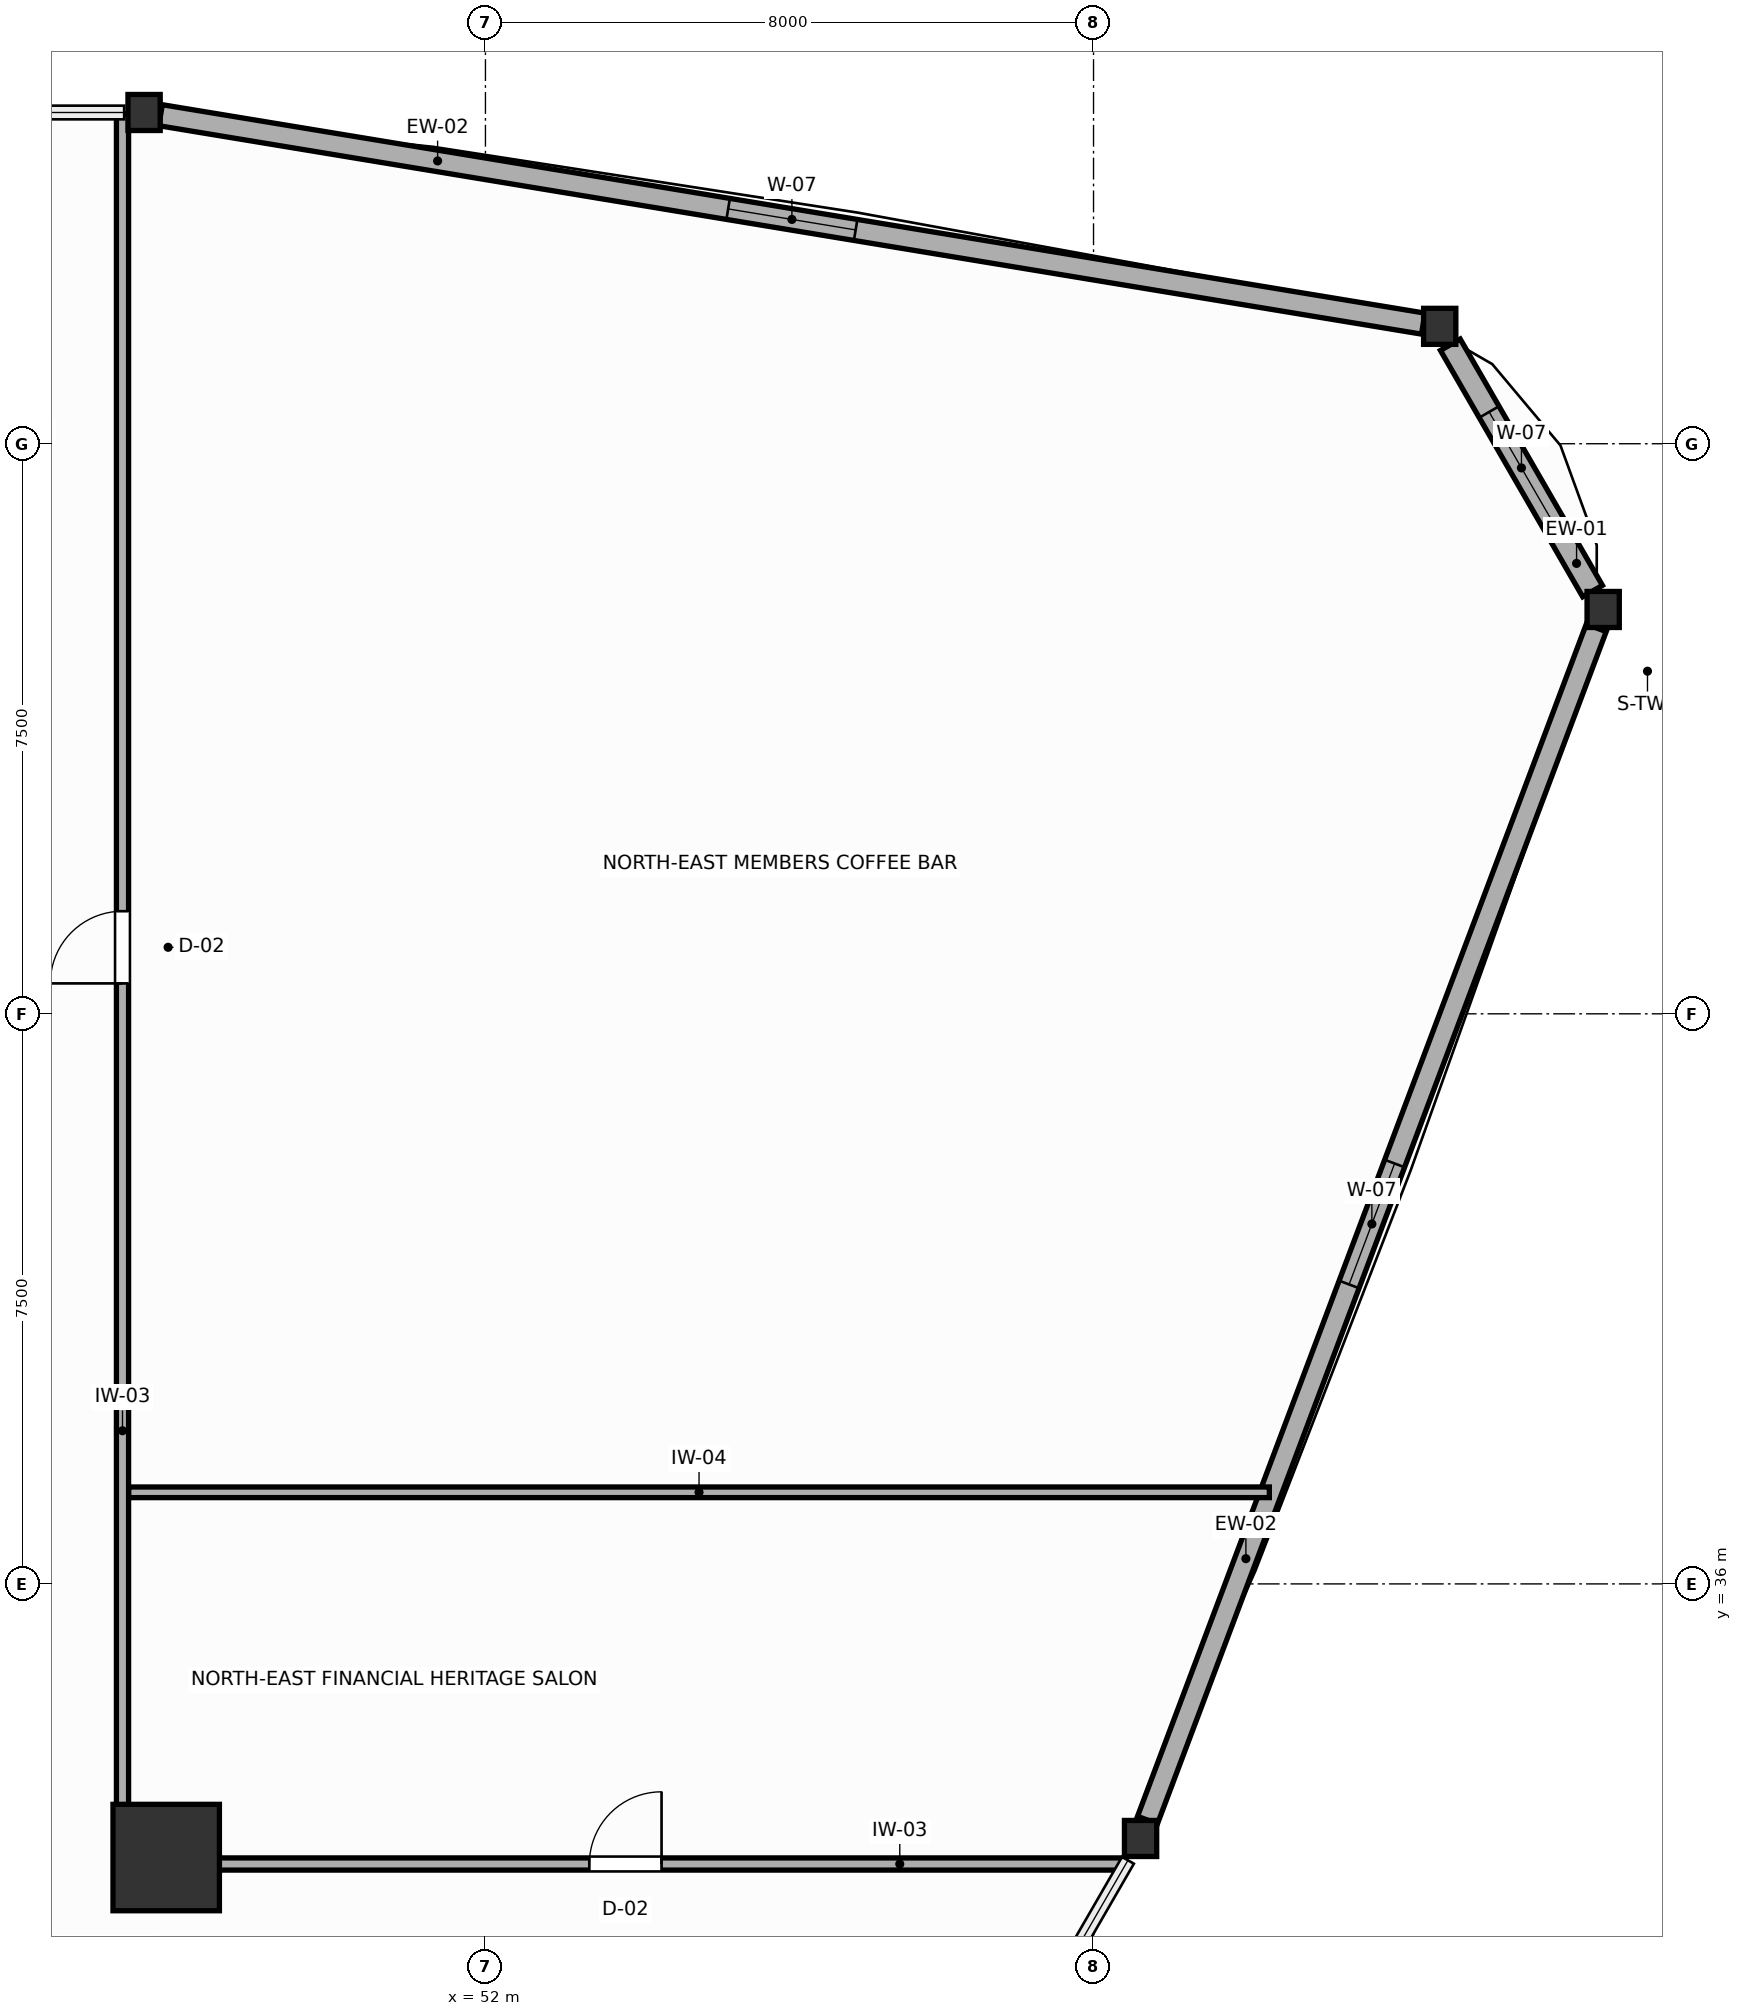
"""IFC4 building model, lengths in metres.
Left out: names, types, materials, properties, quantities, classifications, styles, units other than length and angle.
Written with IfcOpenShell. Run it as: python <this file> out.ifc"""

import sys

from ifc_helpers import new_model, si_unit, direction, frame, frame_2d, origin, origin_2d, place, context, subcontext, project, spatial, rectangle, i_section, extrude, source, transform, mapped, element, fill, save


model = new_model("IFC4")
c1 = context("Model", 3, precision=1e-05, world=origin(), true_north=direction((0.0, 1.0)))
c2 = subcontext(c1, "Body", "Model", "MODEL_VIEW")
j1 = project(units=[si_unit("LENGTHUNIT", "METRE"), si_unit("PLANEANGLEUNIT", "RADIAN")], contexts=[c1])
p1 = place(None, origin())
s1 = spatial("IfcSite", under=j1, at=p1, CompositionType="ELEMENT")
p2 = place(p1, origin())
s2 = spatial("IfcBuilding", under=s1, at=p2, CompositionType="ELEMENT")
p3 = place(p2, frame((0.0, 0.0, 95.1)))
s3 = spatial("IfcBuildingStorey", under=s2, at=p3, CompositionType="ELEMENT", Elevation=95.1)
m1 = source(origin(), c2, "Body", "SweptSolid", [
    extrude(rectangle(XDim=1.4, YDim=1.4, at=origin_2d()), origin(), (0.0, 0.0, 1.0), 3.9),
])
p4 = place(p3, frame((47.8, 32.4, 0.0), z_axis=(0.0, 0.0, 1.0), x_axis=(1.0, 0.0, 0.0)))
e1 = element("IfcColumn", 1, at=p4, inside=s3, PredefinedType="COLUMN", context=c2, shape_type="MappedRepresentation", body=[
    mapped(m1, transform((0.0, 0.0, 0.0), scale=1.0)),
])
m2 = source(origin(), c2, "Body", "SweptSolid", [
    extrude(i_section(OverallWidth=0.424, OverallDepth=0.474, WebThickness=0.045, FlangeThickness=0.072, FilletRadius=0.015, at=origin_2d()), origin(), (0.0, 0.0, 1.0), 3.9),
])
for number, where, z_axis, x_axis in (
    (2, (66.705, 48.82, 0.0), (0.0, 0.0, 1.0), (1.0, 0.0, 0.0)),
    (3, (64.554, 52.544, 0.0), (0.0, 0.0, 1.0), (1.0, 0.0, 0.0)),
    (4, (47.509, 55.358, 0.0), (0.0, 0.0, 1.0), (1.0, 0.0, 0.0)),
    (5, (60.619, 32.651, 0.0), (0.0, 0.0, 1.0), (1.0, 0.0, 0.0)),
):
    element("IfcColumn", number, at=place(p3, frame(where, z_axis=z_axis, x_axis=x_axis)), inside=s3, PredefinedType="COLUMN", context=c2, shape_type="MappedRepresentation", body=[
        mapped(m2, transform((0.0, 0.0, 0.0), scale=1.0)),
    ])
p5 = place(p3, frame((66.565, 49.062, 0.0), z_axis=(0.0, 0.0, 1.0), x_axis=(-0.500012356405, 0.866018269693, 0.0)))
e6 = element("IfcWall", 6, at=p5, inside=s3, PredefinedType="SOLIDWALL", context=c2, shape_type="SweptSolid", body=[
    extrude(rectangle(XDim=3.742, YDim=0.3, at=frame_2d((1.871, 0.0))), origin(), (0.0, 0.0, 1.0), 2.07),
])
p6 = place(p5, frame((1.021, 0.0, 0.75)))
e7 = element("IfcOpeningElement", 7, at=p6, cuts=e6, PredefinedType="OPENING", context=c2, shape_type="SweptSolid", body=[
    extrude(rectangle(XDim=1.7, YDim=1.1, at=frame_2d((0.85, 0.55))), frame((0.0, 0.16, 0.0), z_axis=(0.0, -1.0, 0.0), x_axis=(1.0, 0.0, 0.0)), (0.0, 0.0, 1.0), 0.32),
])
p7 = place(p3, frame((64.337, 52.58, 0.0), z_axis=(0.0, 0.0, 1.0), x_axis=(-0.986649040197, 0.162860896097, 0.0)))
e8 = element("IfcWall", 8, at=p7, inside=s3, PredefinedType="SOLIDWALL", context=c2, shape_type="SweptSolid", body=[
    extrude(rectangle(XDim=16.836, YDim=0.28, at=frame_2d((8.418, 0.0))), origin(), (0.0, 0.0, 1.0), 2.07),
])
p8 = place(p7, frame((7.568, 0.0, 0.75)))
e9 = element("IfcOpeningElement", 9, at=p8, cuts=e8, PredefinedType="OPENING", context=c2, shape_type="SweptSolid", body=[
    extrude(rectangle(XDim=1.7, YDim=1.1, at=frame_2d((0.85, 0.55))), frame((0.0, 0.15, 0.0), z_axis=(0.0, -1.0, 0.0), x_axis=(1.0, 0.0, 0.0)), (0.0, 0.0, 1.0), 0.3),
])
p9 = place(p3, frame((60.71, 32.893, 0.0), z_axis=(0.0, 0.0, 1.0), x_axis=(0.352291780657, 0.935890218605, 0.0)))
e10 = element("IfcWall", 10, at=p9, inside=s3, PredefinedType="SOLIDWALL", context=c2, shape_type="SweptSolid", body=[
    extrude(rectangle(XDim=16.759, YDim=0.28, at=frame_2d((8.379, 0.0))), origin(), (0.0, 0.0, 1.0), 2.07),
])
p10 = place(p9, frame((7.53, 0.0, 0.75)))
e11 = element("IfcOpeningElement", 11, at=p10, cuts=e10, PredefinedType="OPENING", context=c2, shape_type="SweptSolid", body=[
    extrude(rectangle(XDim=1.7, YDim=1.1, at=frame_2d((0.85, 0.55))), frame((0.0, 0.15, 0.0), z_axis=(0.0, -1.0, 0.0), x_axis=(1.0, 0.0, 0.0)), (0.0, 0.0, 1.0), 0.3),
])
p11 = place(p3, frame((47.225, 32.31, 0.0), z_axis=(0.0, 0.0, 1.0), x_axis=(0.0, 1.0, 0.0)))
e12 = element("IfcWall", 12, at=p11, inside=s3, PredefinedType="PARTITIONING", context=c2, shape_type="SweptSolid", body=[
    extrude(rectangle(XDim=23.028, YDim=0.16, at=frame_2d((11.514, 0.0))), origin(), (0.0, 0.0, 1.0), 2.23),
])
p12 = place(p11, frame((11.59, 0.0, 0.0)))
e13 = element("IfcOpeningElement", 13, at=p12, cuts=e12, PredefinedType="OPENING", context=c2, shape_type="SweptSolid", body=[
    extrude(rectangle(XDim=0.95, YDim=2.05, at=frame_2d((0.475, 1.025))), frame((0.0, 0.09, 0.0), z_axis=(0.0, -1.0, 0.0), x_axis=(1.0, 0.0, 0.0)), (0.0, 0.0, 1.0), 0.18),
])
p13 = place(p3, frame((47.307, 32.315, 0.0), z_axis=(0.0, 0.0, 1.0), x_axis=(1.0, 0.0, 0.0)))
e14 = element("IfcWall", 14, at=p13, inside=s3, PredefinedType="PARTITIONING", context=c2, shape_type="SweptSolid", body=[
    extrude(rectangle(XDim=13.098, YDim=0.16, at=frame_2d((6.549, 0.0))), origin(), (0.0, 0.0, 1.0), 2.23),
])
p14 = place(p13, frame((6.06, 0.0, 0.0)))
e15 = element("IfcOpeningElement", 15, at=p14, cuts=e14, PredefinedType="OPENING", context=c2, shape_type="SweptSolid", body=[
    extrude(rectangle(XDim=0.95, YDim=2.05, at=frame_2d((0.475, 1.025))), frame((0.0, 0.09, 0.0), z_axis=(0.0, -1.0, 0.0), x_axis=(1.0, 0.0, 0.0)), (0.0, 0.0, 1.0), 0.18),
])
p15 = place(p3, frame((47.307, 37.205, 0.0), z_axis=(0.0, 0.0, 1.0), x_axis=(1.0, 0.0, 0.0)))
e16 = element("IfcWall", 16, at=p15, inside=s3, PredefinedType="PARTITIONING", context=c2, shape_type="SweptSolid", body=[
    extrude(rectangle(XDim=15.006, YDim=0.14, at=frame_2d((7.503, 0.0))), origin(), (0.0, 0.0, 1.0), 3.7),
])
p16 = place(p6, origin())
e17 = element("IfcWindow", 17, at=p16, inside=s3, PartitioningType="SINGLE_PANEL", PredefinedType="WINDOW", context=c2, shape_type="SweptSolid", body=[
    extrude(rectangle(XDim=1.7, YDim=1.1, at=frame_2d((0.85, 0.55))), frame((0.0, 0.03, 0.0), z_axis=(0.0, -1.0, 0.0), x_axis=(1.0, 0.0, 0.0)), (0.0, 0.0, 1.0), 0.06),
])
fill(e7, e17)
p17 = place(p8, origin())
e18 = element("IfcWindow", 18, at=p17, inside=s3, PartitioningType="SINGLE_PANEL", PredefinedType="WINDOW", context=c2, shape_type="SweptSolid", body=[
    extrude(rectangle(XDim=1.7, YDim=1.1, at=frame_2d((0.85, 0.55))), frame((0.0, 0.03, 0.0), z_axis=(0.0, -1.0, 0.0), x_axis=(1.0, 0.0, 0.0)), (0.0, 0.0, 1.0), 0.06),
])
fill(e9, e18)
p18 = place(p10, origin())
e19 = element("IfcWindow", 19, at=p18, inside=s3, PartitioningType="SINGLE_PANEL", PredefinedType="WINDOW", context=c2, shape_type="SweptSolid", body=[
    extrude(rectangle(XDim=1.7, YDim=1.1, at=frame_2d((0.85, 0.55))), frame((0.0, 0.03, 0.0), z_axis=(0.0, -1.0, 0.0), x_axis=(1.0, 0.0, 0.0)), (0.0, 0.0, 1.0), 0.06),
])
fill(e11, e19)
p19 = place(p12, origin())
e20 = element("IfcDoor", 20, at=p19, inside=s3, OperationType="SINGLE_SWING_LEFT", PredefinedType="DOOR", context=c2, shape_type="SweptSolid", body=[
    extrude(rectangle(XDim=0.95, YDim=2.05, at=frame_2d((0.475, 1.025))), frame((0.0, 0.025, 0.0), z_axis=(0.0, -1.0, 0.0), x_axis=(1.0, 0.0, 0.0)), (0.0, 0.0, 1.0), 0.05),
])
fill(e13, e20)
p20 = place(p14, origin())
e21 = element("IfcDoor", 21, at=p20, inside=s3, OperationType="SINGLE_SWING_RIGHT", PredefinedType="DOOR", context=c2, shape_type="SweptSolid", body=[
    extrude(rectangle(XDim=0.95, YDim=2.05, at=frame_2d((0.475, 1.025))), frame((0.0, 0.025, 0.0), z_axis=(0.0, -1.0, 0.0), x_axis=(1.0, 0.0, 0.0)), (0.0, 0.0, 1.0), 0.05),
])
fill(e15, e21)
save(model, sys.argv[1])
